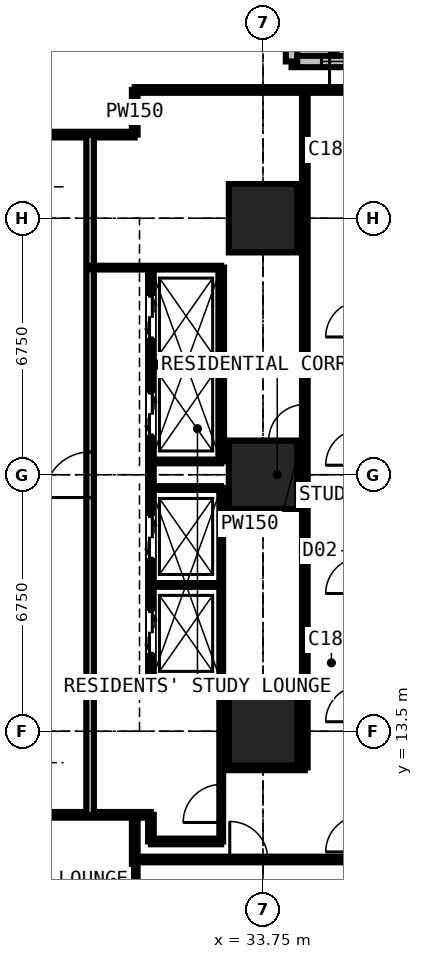
"""IFC4 building model, lengths in metres.
Left out: names, types, materials, properties, quantities, classifications, styles, units other than length and angle.
Written with IfcOpenShell. Run it as: python <this file> out.ifc"""

import sys

from ifc_helpers import new_model, si_unit, direction, frame, frame_2d, origin, origin_2d, place, context, subcontext, project, spatial, rectangle, extrude, element, fill, save


model = new_model("IFC4")
c1 = context("Model", 3, precision=1e-05, world=origin(), true_north=direction((0.0, 1.0)))
c2 = subcontext(c1, "Body", "Model", "MODEL_VIEW")
j1 = project(units=[si_unit("LENGTHUNIT", "METRE"), si_unit("PLANEANGLEUNIT", "RADIAN")], contexts=[c1])
p1 = place(None, origin())
s1 = spatial("IfcSite", under=j1, at=p1, CompositionType="ELEMENT")
p2 = place(p1, origin())
s2 = spatial("IfcBuilding", under=s1, at=p2, CompositionType="ELEMENT")
p3 = place(p2, frame((0.0, 0.0, 94.5)))
s3 = spatial("IfcBuildingStorey", under=s2, at=p3, CompositionType="ELEMENT", Elevation=94.5)
for number, where, z_axis, x_axis in (
    (1, (33.75, 13.5, 0.0), (0.0, 0.0, 1.0), (1.0, 0.0, 0.0)),
    (2, (33.75, 20.25, 0.0), (0.0, 0.0, 1.0), (1.0, 0.0, 0.0)),
    (3, (33.75, 27.0, 0.0), (0.0, 0.0, 1.0), (1.0, 0.0, 0.0)),
):
    element("IfcColumn", number, at=place(p3, frame(where, z_axis=z_axis, x_axis=x_axis)), inside=s3, PredefinedType="COLUMN", context=c2, shape_type="SweptSolid", body=[
        extrude(rectangle(XDim=1.8, YDim=1.8, at=origin_2d()), origin(), (0.0, 0.0, 1.0), 3.6),
    ])
p4 = place(p3, frame((37.875, 31.125, 0.0), z_axis=(0.0, 0.0, 1.0), x_axis=(-1.0, 0.0, 0.0)))
e4 = element("IfcWall", 4, at=p4, inside=s3, PredefinedType="SOLIDWALL", context=c2, shape_type="SweptSolid", body=[
    extrude(rectangle(XDim=3.375, YDim=0.3, at=frame_2d((1.688, 0.0))), origin(), (0.0, 0.0, 1.0), 3.375),
])
p5 = place(p4, frame((0.788, 0.0, 0.6)))
e5 = element("IfcOpeningElement", 5, at=p5, cuts=e4, PredefinedType="OPENING", context=c2, shape_type="SweptSolid", body=[
    extrude(rectangle(XDim=1.8, YDim=2.1, at=frame_2d((0.9, 1.05))), frame((0.0, 0.16, 0.0), z_axis=(0.0, -1.0, 0.0), x_axis=(1.0, 0.0, 0.0)), (0.0, 0.0, 1.0), 0.32),
])
p6 = place(p3, frame((34.5, 31.125, 0.0), z_axis=(0.0, 0.0, 1.0), x_axis=(0.0, 1.0, 0.0)))
e6 = element("IfcWall", 6, at=p6, inside=s3, PredefinedType="SOLIDWALL", context=c2, shape_type="SweptSolid", body=[
    extrude(rectangle(XDim=3.375, YDim=0.3, at=frame_2d((1.688, 0.0))), origin(), (0.0, 0.0, 1.0), 3.375),
])
p7 = place(p6, frame((0.343, 0.0, 0.9)))
e7 = element("IfcOpeningElement", 7, at=p7, cuts=e6, PredefinedType="OPENING", context=c2, shape_type="SweptSolid", body=[
    extrude(rectangle(XDim=1.2, YDim=1.8, at=frame_2d((0.6, 0.9))), frame((0.0, 0.16, 0.0), z_axis=(0.0, -1.0, 0.0), x_axis=(1.0, 0.0, 0.0)), (0.0, 0.0, 1.0), 0.32),
])
p8 = place(p3, frame((10.125, 11.3, 0.0), z_axis=(0.0, 0.0, 1.0), x_axis=(1.0, 0.0, 0.0)))
e8 = element("IfcWall", 8, at=p8, inside=s3, PredefinedType="PARTITIONING", context=c2, shape_type="SweptSolid", body=[
    extrude(rectangle(XDim=20.675, YDim=0.15, at=frame_2d((10.337, 0.0))), origin(), (0.0, 0.0, 1.0), 3.375),
])
p9 = place(p8, frame((11.312, 0.0, 0.0)))
e9 = element("IfcOpeningElement", 9, at=p9, cuts=e8, PredefinedType="OPENING", context=c2, shape_type="SweptSolid", body=[
    extrude(rectangle(XDim=1.0, YDim=2.2, at=frame_2d((0.5, 1.1))), frame((0.0, 0.085, 0.0), z_axis=(0.0, -1.0, 0.0), x_axis=(1.0, 0.0, 0.0)), (0.0, 0.0, 1.0), 0.17),
])
p10 = place(p3, frame((11.3, 29.2, 0.0), z_axis=(0.0, 0.0, 1.0), x_axis=(1.0, 0.0, 0.0)))
e10 = element("IfcWall", 10, at=p10, inside=s3, PredefinedType="PARTITIONING", context=c2, shape_type="SweptSolid", body=[
    extrude(rectangle(XDim=19.075, YDim=0.15, at=frame_2d((9.538, 0.0))), origin(), (0.0, 0.0, 1.0), 3.375),
])
p11 = place(p10, frame((6.4, 0.0, 0.0)))
e11 = element("IfcOpeningElement", 11, at=p11, cuts=e10, PredefinedType="OPENING", context=c2, shape_type="SweptSolid", body=[
    extrude(rectangle(XDim=0.95, YDim=2.2, at=frame_2d((0.475, 1.1))), frame((0.0, 0.085, 0.0), z_axis=(0.0, -1.0, 0.0), x_axis=(1.0, 0.0, 0.0)), (0.0, 0.0, 1.0), 0.17),
])
p12 = place(p10, frame((9.2, 0.0, 0.0)))
e12 = element("IfcOpeningElement", 12, at=p12, cuts=e10, PredefinedType="OPENING", context=c2, shape_type="SweptSolid", body=[
    extrude(rectangle(XDim=0.95, YDim=2.2, at=frame_2d((0.475, 1.1))), frame((0.0, 0.085, 0.0), z_axis=(0.0, -1.0, 0.0), x_axis=(1.0, 0.0, 0.0)), (0.0, 0.0, 1.0), 0.17),
])
p13 = place(p10, frame((0.6, 0.0, 0.0)))
e13 = element("IfcOpeningElement", 13, at=p13, cuts=e10, PredefinedType="OPENING", context=c2, shape_type="SweptSolid", body=[
    extrude(rectangle(XDim=1.0, YDim=2.2, at=frame_2d((0.5, 1.1))), frame((0.0, 0.085, 0.0), z_axis=(0.0, -1.0, 0.0), x_axis=(1.0, 0.0, 0.0)), (0.0, 0.0, 1.0), 0.17),
])
p14 = place(p3, frame((29.2, 11.3, 0.0), z_axis=(0.0, 0.0, 1.0), x_axis=(0.0, 1.0, 0.0)))
e14 = element("IfcWall", 14, at=p14, inside=s3, PredefinedType="PARTITIONING", context=c2, shape_type="SweptSolid", body=[
    extrude(rectangle(XDim=17.9, YDim=0.2, at=frame_2d((8.95, 0.0))), origin(), (0.0, 0.0, 1.0), 3.375),
])
p15 = place(p14, frame((8.35, 0.0, 0.0)))
e15 = element("IfcOpeningElement", 15, at=p15, cuts=e14, PredefinedType="OPENING", context=c2, shape_type="SweptSolid", body=[
    extrude(rectangle(XDim=1.2, YDim=2.2, at=frame_2d((0.6, 1.1))), frame((0.0, 0.11, 0.0), z_axis=(0.0, -1.0, 0.0), x_axis=(1.0, 0.0, 0.0)), (0.0, 0.0, 1.0), 0.22),
])
p16 = place(p3, frame((29.2, 25.7, 0.0), z_axis=(0.0, 0.0, 1.0), x_axis=(1.0, 0.0, 0.0)))
e16 = element("IfcWall", 16, at=p16, inside=s3, PredefinedType="SHEAR", context=c2, shape_type="SweptSolid", body=[
    extrude(rectangle(XDim=3.45, YDim=0.1, at=frame_2d((1.725, 0.0))), origin(), (0.0, 0.0, 1.0), 3.375),
])
p17 = place(p3, frame((30.375, -0.734, 0.0), z_axis=(0.0, 0.0, 1.0), x_axis=(0.0, 1.0, 0.0)))
e17 = element("IfcWall", 17, at=p17, inside=s3, PredefinedType="PARTITIONING", context=c2, shape_type="SweptSolid", body=[
    extrude(rectangle(XDim=12.034, YDim=0.15, at=frame_2d((6.017, 0.0))), origin(), (0.0, 0.0, 1.0), 3.375),
])
p18 = place(p3, frame((30.375, 10.125, 0.0), z_axis=(0.0, 0.0, 1.0), x_axis=(1.0, 0.0, 0.0)))
e18 = element("IfcWall", 18, at=p18, inside=s3, PredefinedType="PARTITIONING", context=c2, shape_type="SweptSolid", body=[
    extrude(rectangle(XDim=10.859, YDim=0.15, at=frame_2d((5.429, 0.0))), origin(), (0.0, 0.0, 1.0), 3.375),
])
p19 = place(p18, frame((2.5, 0.0, 0.0)))
e19 = element("IfcOpeningElement", 19, at=p19, cuts=e18, PredefinedType="OPENING", context=c2, shape_type="SweptSolid", body=[
    extrude(rectangle(XDim=1.0, YDim=2.2, at=frame_2d((0.5, 1.1))), frame((0.0, 0.085, 0.0), z_axis=(0.0, -1.0, 0.0), x_axis=(1.0, 0.0, 0.0)), (0.0, 0.0, 1.0), 0.17),
])
p20 = place(p3, frame((30.375, 29.2, 0.0), z_axis=(0.0, 0.0, 1.0), x_axis=(0.0, 1.0, 0.0)))
e20 = element("IfcWall", 20, at=p20, inside=s3, PredefinedType="PARTITIONING", context=c2, shape_type="SweptSolid", body=[
    extrude(rectangle(XDim=1.175, YDim=0.15, at=frame_2d((0.587, 0.0))), origin(), (0.0, 0.0, 1.0), 3.375),
])
p21 = place(p3, frame((30.375, 30.375, 0.0), z_axis=(0.0, 0.0, 1.0), x_axis=(1.0, 0.0, 0.0)))
e21 = element("IfcWall", 21, at=p21, inside=s3, PredefinedType="PARTITIONING", context=c2, shape_type="SweptSolid", body=[
    extrude(rectangle(XDim=7.35, YDim=0.15, at=frame_2d((3.675, 0.0))), origin(), (0.0, 0.0, 1.0), 2.877),
])
p22 = place(p21, frame((5.125, 0.0, 0.0)))
e22 = element("IfcOpeningElement", 22, at=p22, cuts=e21, PredefinedType="OPENING", context=c2, shape_type="SweptSolid", body=[
    extrude(rectangle(XDim=1.0, YDim=2.2, at=frame_2d((0.5, 1.1))), frame((0.0, 0.085, 0.0), z_axis=(0.0, -1.0, 0.0), x_axis=(1.0, 0.0, 0.0)), (0.0, 0.0, 1.0), 0.17),
])
p23 = place(p3, frame((30.8, 10.6, 0.0), z_axis=(0.0, 0.0, 1.0), x_axis=(0.0, 1.0, 0.0)))
e23 = element("IfcWall", 23, at=p23, inside=s3, PredefinedType="PARTITIONING", context=c2, shape_type="SweptSolid", body=[
    extrude(rectangle(XDim=0.7, YDim=0.15, at=frame_2d((0.35, 0.0))), origin(), (0.0, 0.0, 1.0), 3.375),
])
p24 = place(p3, frame((30.8, 10.6, 0.0), z_axis=(0.0, 0.0, 1.0), x_axis=(1.0, 0.0, 0.0)))
e24 = element("IfcWall", 24, at=p24, inside=s3, PredefinedType="PARTITIONING", context=c2, shape_type="SweptSolid", body=[
    extrude(rectangle(XDim=1.85, YDim=0.15, at=frame_2d((0.925, 0.0))), origin(), (0.0, 0.0, 1.0), 3.375),
])
p25 = place(p3, frame((30.8, 14.8, 0.0), z_axis=(0.0, 0.0, 1.0), x_axis=(0.0, 1.0, 0.0)))
e25 = element("IfcWall", 25, at=p25, inside=s3, PredefinedType="PARTITIONING", context=c2, shape_type="SweptSolid", body=[
    extrude(rectangle(XDim=10.9, YDim=0.15, at=frame_2d((5.45, 0.0))), origin(), (0.0, 0.0, 1.0), 3.375),
])
p26 = place(p25, frame((0.75, 0.0, 0.0)))
e26 = element("IfcOpeningElement", 26, at=p26, cuts=e25, PredefinedType="OPENING", context=c2, shape_type="SweptSolid", body=[
    extrude(rectangle(XDim=1.1, YDim=2.2, at=frame_2d((0.55, 1.1))), frame((0.0, 0.085, 0.0), z_axis=(0.0, -1.0, 0.0), x_axis=(1.0, 0.0, 0.0)), (0.0, 0.0, 1.0), 0.17),
])
p27 = place(p25, frame((3.25, 0.0, 0.0)))
e27 = element("IfcOpeningElement", 27, at=p27, cuts=e25, PredefinedType="OPENING", context=c2, shape_type="SweptSolid", body=[
    extrude(rectangle(XDim=1.1, YDim=2.2, at=frame_2d((0.55, 1.1))), frame((0.0, 0.085, 0.0), z_axis=(0.0, -1.0, 0.0), x_axis=(1.0, 0.0, 0.0)), (0.0, 0.0, 1.0), 0.17),
])
p28 = place(p25, frame((6.5, 0.0, 0.0)))
e28 = element("IfcOpeningElement", 28, at=p28, cuts=e25, PredefinedType="OPENING", context=c2, shape_type="SweptSolid", body=[
    extrude(rectangle(XDim=1.1, YDim=2.2, at=frame_2d((0.55, 1.1))), frame((0.0, 0.085, 0.0), z_axis=(0.0, -1.0, 0.0), x_axis=(1.0, 0.0, 0.0)), (0.0, 0.0, 1.0), 0.17),
])
p29 = place(p25, frame((9.05, 0.0, 0.0)))
e29 = element("IfcOpeningElement", 29, at=p29, cuts=e25, PredefinedType="OPENING", context=c2, shape_type="SweptSolid", body=[
    extrude(rectangle(XDim=1.1, YDim=2.2, at=frame_2d((0.55, 1.1))), frame((0.0, 0.085, 0.0), z_axis=(0.0, -1.0, 0.0), x_axis=(1.0, 0.0, 0.0)), (0.0, 0.0, 1.0), 0.17),
])
for number, where, z_axis, x_axis in (
    (30, (30.8, 14.8, 0.0), (0.0, 0.0, 1.0), (1.0, 0.0, 0.0)),
    (31, (30.8, 17.35, 0.0), (0.0, 0.0, 1.0), (1.0, 0.0, 0.0)),
    (32, (30.8, 19.9, 0.0), (0.0, 0.0, 1.0), (1.0, 0.0, 0.0)),
    (33, (30.8, 20.6, 0.0), (0.0, 0.0, 1.0), (1.0, 0.0, 0.0)),
    (34, (30.8, 23.15, 0.0), (0.0, 0.0, 1.0), (1.0, 0.0, 0.0)),
):
    element("IfcWall", number, at=place(p3, frame(where, z_axis=z_axis, x_axis=x_axis)), inside=s3, PredefinedType="SHEAR", context=c2, shape_type="SweptSolid", body=[
        extrude(rectangle(XDim=1.85, YDim=0.1, at=frame_2d((0.925, 0.0))), origin(), (0.0, 0.0, 1.0), 3.375),
    ])
p30 = place(p3, frame((32.65, 10.6, 0.0), z_axis=(0.0, 0.0, 1.0), x_axis=(0.0, 1.0, 0.0)))
e35 = element("IfcWall", 35, at=p30, inside=s3, PredefinedType="SHEAR", context=c2, shape_type="SweptSolid", body=[
    extrude(rectangle(XDim=9.3, YDim=0.1, at=frame_2d((4.65, 0.0))), origin(), (0.0, 0.0, 1.0), 3.375),
])
p31 = place(p30, frame((0.5, 0.0, 0.0)))
e36 = element("IfcOpeningElement", 36, at=p31, cuts=e35, PredefinedType="OPENING", context=c2, shape_type="SweptSolid", body=[
    extrude(rectangle(XDim=1.0, YDim=2.2, at=frame_2d((0.5, 1.1))), frame((0.0, 0.06, 0.0), z_axis=(0.0, -1.0, 0.0), x_axis=(1.0, 0.0, 0.0)), (0.0, 0.0, 1.0), 0.12),
])
p32 = place(p3, frame((32.65, 12.55, 0.0), z_axis=(0.0, 0.0, 1.0), x_axis=(1.0, 0.0, 0.0)))
e37 = element("IfcWall", 37, at=p32, inside=s3, PredefinedType="PARTITIONING", context=c2, shape_type="SweptSolid", body=[
    extrude(rectangle(XDim=2.2, YDim=0.15, at=frame_2d((1.1, 0.0))), origin(), (0.0, 0.0, 1.0), 3.375),
])
p33 = place(p3, frame((32.65, 20.6, 0.0), z_axis=(0.0, 0.0, 1.0), x_axis=(0.0, 1.0, 0.0)))
e38 = element("IfcWall", 38, at=p33, inside=s3, PredefinedType="PARTITIONING", context=c2, shape_type="SweptSolid", body=[
    extrude(rectangle(XDim=5.1, YDim=0.15, at=frame_2d((2.55, 0.0))), origin(), (0.0, 0.0, 1.0), 3.375),
])
p34 = place(p3, frame((34.85, 12.55, 0.0), z_axis=(0.0, 0.0, 1.0), x_axis=(0.0, 1.0, 0.0)))
e39 = element("IfcWall", 39, at=p34, inside=s3, PredefinedType="PARTITIONING", context=c2, shape_type="SweptSolid", body=[
    extrude(rectangle(XDim=17.825, YDim=0.15, at=frame_2d((8.913, 0.0))), origin(), (0.0, 0.0, 1.0), 3.375),
])
p35 = place(p34, frame((8.6, 0.0, 0.0)))
e40 = element("IfcOpeningElement", 40, at=p35, cuts=e39, PredefinedType="OPENING", context=c2, shape_type="SweptSolid", body=[
    extrude(rectangle(XDim=0.95, YDim=2.2, at=frame_2d((0.475, 1.1))), frame((0.0, 0.085, 0.0), z_axis=(0.0, -1.0, 0.0), x_axis=(1.0, 0.0, 0.0)), (0.0, 0.0, 1.0), 0.17),
])
p36 = place(p5, origin())
e41 = element("IfcWindow", 41, at=p36, inside=s3, PartitioningType="SINGLE_PANEL", PredefinedType="WINDOW", context=c2, shape_type="SweptSolid", body=[
    extrude(rectangle(XDim=1.8, YDim=2.1, at=frame_2d((0.9, 1.05))), frame((0.0, 0.03, 0.0), z_axis=(0.0, -1.0, 0.0), x_axis=(1.0, 0.0, 0.0)), (0.0, 0.0, 1.0), 0.06),
])
fill(e5, e41)
p37 = place(p19, origin())
e42 = element("IfcDoor", 42, at=p37, inside=s3, OperationType="SINGLE_SWING_LEFT", PredefinedType="DOOR", context=c2, shape_type="SweptSolid", body=[
    extrude(rectangle(XDim=1.0, YDim=2.2, at=frame_2d((0.5, 1.1))), frame((0.0, 0.025, 0.0), z_axis=(0.0, -1.0, 0.0), x_axis=(1.0, 0.0, 0.0)), (0.0, 0.0, 1.0), 0.05),
])
fill(e19, e42)
p38 = place(p31, origin())
e43 = element("IfcDoor", 43, at=p38, inside=s3, OperationType="SINGLE_SWING_LEFT", PredefinedType="DOOR", context=c2, shape_type="SweptSolid", body=[
    extrude(rectangle(XDim=1.0, YDim=2.2, at=frame_2d((0.5, 1.1))), frame((0.0, 0.025, 0.0), z_axis=(0.0, -1.0, 0.0), x_axis=(1.0, 0.0, 0.0)), (0.0, 0.0, 1.0), 0.05),
])
fill(e36, e43)
p39 = place(p35, origin())
e44 = element("IfcDoor", 44, at=p39, inside=s3, OperationType="SINGLE_SWING_LEFT", PredefinedType="DOOR", context=c2, shape_type="SweptSolid", body=[
    extrude(rectangle(XDim=0.95, YDim=2.2, at=frame_2d((0.475, 1.1))), frame((0.0, 0.025, 0.0), z_axis=(0.0, -1.0, 0.0), x_axis=(1.0, 0.0, 0.0)), (0.0, 0.0, 1.0), 0.05),
])
fill(e40, e44)
p40 = place(p22, origin())
e45 = element("IfcDoor", 45, at=p40, inside=s3, OperationType="SINGLE_SWING_LEFT", PredefinedType="DOOR", context=c2, shape_type="SweptSolid", body=[
    extrude(rectangle(XDim=1.0, YDim=2.2, at=frame_2d((0.5, 1.1))), frame((0.0, 0.025, 0.0), z_axis=(0.0, -1.0, 0.0), x_axis=(1.0, 0.0, 0.0)), (0.0, 0.0, 1.0), 0.05),
])
fill(e22, e45)
p41 = place(p26, origin())
e46 = element("IfcDoor", 46, at=p41, inside=s3, OperationType="DOUBLE_DOOR_SLIDING", PredefinedType="DOOR", context=c2, shape_type="SweptSolid", body=[
    extrude(rectangle(XDim=1.1, YDim=2.2, at=frame_2d((0.55, 1.1))), frame((0.0, 0.025, 0.0), z_axis=(0.0, -1.0, 0.0), x_axis=(1.0, 0.0, 0.0)), (0.0, 0.0, 1.0), 0.05),
])
fill(e26, e46)
p42 = place(p27, origin())
e47 = element("IfcDoor", 47, at=p42, inside=s3, OperationType="DOUBLE_DOOR_SLIDING", PredefinedType="DOOR", context=c2, shape_type="SweptSolid", body=[
    extrude(rectangle(XDim=1.1, YDim=2.2, at=frame_2d((0.55, 1.1))), frame((0.0, 0.025, 0.0), z_axis=(0.0, -1.0, 0.0), x_axis=(1.0, 0.0, 0.0)), (0.0, 0.0, 1.0), 0.05),
])
fill(e27, e47)
p43 = place(p28, origin())
e48 = element("IfcDoor", 48, at=p43, inside=s3, OperationType="DOUBLE_DOOR_SLIDING", PredefinedType="DOOR", context=c2, shape_type="SweptSolid", body=[
    extrude(rectangle(XDim=1.1, YDim=2.2, at=frame_2d((0.55, 1.1))), frame((0.0, 0.025, 0.0), z_axis=(0.0, -1.0, 0.0), x_axis=(1.0, 0.0, 0.0)), (0.0, 0.0, 1.0), 0.05),
])
fill(e28, e48)
p44 = place(p29, origin())
e49 = element("IfcDoor", 49, at=p44, inside=s3, OperationType="DOUBLE_DOOR_SLIDING", PredefinedType="DOOR", context=c2, shape_type="SweptSolid", body=[
    extrude(rectangle(XDim=1.1, YDim=2.2, at=frame_2d((0.55, 1.1))), frame((0.0, 0.025, 0.0), z_axis=(0.0, -1.0, 0.0), x_axis=(1.0, 0.0, 0.0)), (0.0, 0.0, 1.0), 0.05),
])
fill(e29, e49)
p45 = place(p15, origin())
e50 = element("IfcDoor", 50, at=p45, inside=s3, OperationType="DOUBLE_DOOR_SINGLE_SWING", PredefinedType="DOOR", context=c2, shape_type="SweptSolid", body=[
    extrude(rectangle(XDim=1.2, YDim=2.2, at=frame_2d((0.6, 1.1))), frame((0.0, 0.025, 0.0), z_axis=(0.0, -1.0, 0.0), x_axis=(1.0, 0.0, 0.0)), (0.0, 0.0, 1.0), 0.05),
])
fill(e15, e50)
save(model, sys.argv[1])
